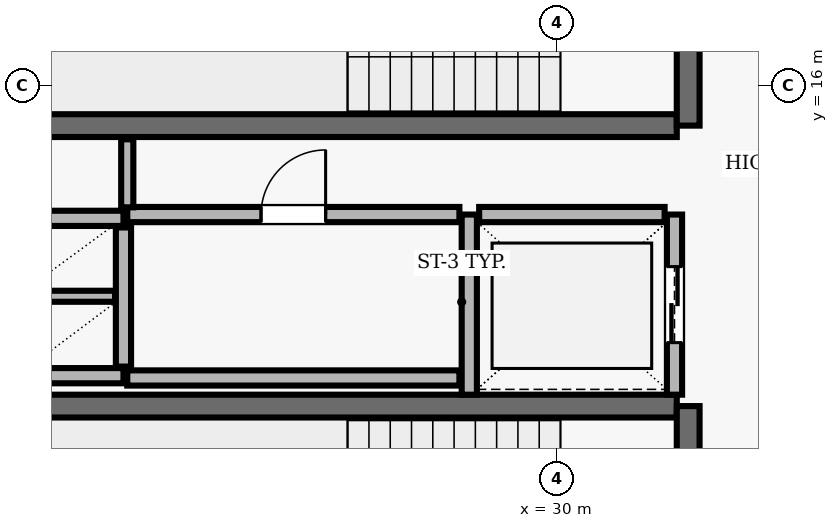
"""IFC4 building model, lengths in metres.
Left out: names, types, materials, properties, quantities, classifications, styles, units other than length and angle.
Written with IfcOpenShell. Run it as: python <this file> out.ifc"""

import sys

from ifc_helpers import new_model, si_unit, direction, frame, frame_2d, origin, place, context, subcontext, project, spatial, rectangle, extrude, element, fill, save


model = new_model("IFC4")
c1 = context("Model", 3, precision=1e-05, world=origin(), true_north=direction((0.0, 1.0)))
c2 = subcontext(c1, "Body", "Model", "MODEL_VIEW")
j1 = project(units=[si_unit("LENGTHUNIT", "METRE"), si_unit("PLANEANGLEUNIT", "RADIAN")], contexts=[c1])
p1 = place(None, origin())
s1 = spatial("IfcSite", under=j1, at=p1, CompositionType="ELEMENT")
p2 = place(p1, origin())
s2 = spatial("IfcBuilding", under=s1, at=p2, CompositionType="ELEMENT")
p3 = place(p2, frame((0.0, 0.0, 218.7)))
s3 = spatial("IfcBuildingStorey", under=s2, at=p3, CompositionType="ELEMENT", Elevation=218.7)
p4 = place(p3, frame((23.22, 15.47, 0.0), z_axis=(0.0, 0.0, 1.0), x_axis=(1.0, 0.0, 0.0)))
e1 = element("IfcWall", 1, at=p4, inside=s3, PredefinedType="SHEAR", context=c2, shape_type="SweptSolid", body=[
    extrude(rectangle(XDim=8.36, YDim=0.3, at=frame_2d((4.18, 0.0))), origin(), (0.0, 0.0, 1.0), 3.69),
])
p5 = place(p3, frame((31.73, 15.47, 0.0), z_axis=(0.0, 0.0, 1.0), x_axis=(0.0, 1.0, 0.0)))
e2 = element("IfcWall", 2, at=p5, inside=s3, PredefinedType="SHEAR", context=c2, shape_type="SweptSolid", body=[
    extrude(rectangle(XDim=3.51, YDim=0.3, at=frame_2d((1.755, 0.0))), origin(), (0.0, 0.0, 1.0), 3.69),
])
p6 = place(p5, frame((1.18, 0.0, 0.0)))
e3 = element("IfcOpeningElement", 3, at=p6, cuts=e2, PredefinedType="OPENING", context=c2, shape_type="SweptSolid", body=[
    extrude(rectangle(XDim=1.15, YDim=2.15, at=frame_2d((0.575, 1.075))), frame((0.0, 0.16, 0.0), z_axis=(0.0, -1.0, 0.0), x_axis=(1.0, 0.0, 0.0)), (0.0, 0.0, 1.0), 0.32),
])
p7 = place(p3, frame((31.58, 11.78, 0.0), z_axis=(0.0, 0.0, 1.0), x_axis=(-1.0, 0.0, 0.0)))
e4 = element("IfcWall", 4, at=p7, inside=s3, PredefinedType="SHEAR", context=c2, shape_type="SweptSolid", body=[
    extrude(rectangle(XDim=8.36, YDim=0.3, at=frame_2d((4.18, 0.0))), origin(), (0.0, 0.0, 1.0), 3.69),
])
p8 = place(p3, frame((31.73, 8.27, 0.0), z_axis=(0.0, 0.0, 1.0), x_axis=(0.0, 1.0, 0.0)))
e5 = element("IfcWall", 5, at=p8, inside=s3, PredefinedType="SHEAR", context=c2, shape_type="SweptSolid", body=[
    extrude(rectangle(XDim=3.51, YDim=0.3, at=frame_2d((1.755, 0.0))), origin(), (0.0, 0.0, 1.0), 3.69),
])
p9 = place(p8, frame((1.18, 0.0, 0.0)))
e6 = element("IfcOpeningElement", 6, at=p9, cuts=e5, PredefinedType="OPENING", context=c2, shape_type="SweptSolid", body=[
    extrude(rectangle(XDim=1.15, YDim=2.15, at=frame_2d((0.575, 1.075))), frame((0.0, 0.16, 0.0), z_axis=(0.0, -1.0, 0.0), x_axis=(1.0, 0.0, 0.0)), (0.0, 0.0, 1.0), 0.32),
])
p10 = place(p3, frame((28.85, 14.3, 0.0), z_axis=(0.0, 0.0, 1.0), x_axis=(0.0, -1.0, 0.0)))
e7 = element("IfcWall", 7, at=p10, inside=s3, PredefinedType="SOLIDWALL", context=c2, shape_type="SweptSolid", body=[
    extrude(rectangle(XDim=2.37, YDim=0.2, at=frame_2d((1.185, 0.0))), origin(), (0.0, 0.0, 1.0), 3.69),
])
p11 = place(p3, frame((31.55, 11.93, 0.0), z_axis=(0.0, 0.0, 1.0), x_axis=(0.0, 1.0, 0.0)))
e8 = element("IfcWall", 8, at=p11, inside=s3, PredefinedType="SOLIDWALL", context=c2, shape_type="SweptSolid", body=[
    extrude(rectangle(XDim=2.37, YDim=0.2, at=frame_2d((1.185, 0.0))), origin(), (0.0, 0.0, 1.0), 3.69),
])
p12 = place(p11, frame((0.685, 0.0, 0.0)))
e9 = element("IfcOpeningElement", 9, at=p12, cuts=e8, PredefinedType="OPENING", context=c2, shape_type="SweptSolid", body=[
    extrude(rectangle(XDim=1.0, YDim=2.1, at=frame_2d((0.5, 1.05))), frame((0.0, 0.11, 0.0), z_axis=(0.0, -1.0, 0.0), x_axis=(1.0, 0.0, 0.0)), (0.0, 0.0, 1.0), 0.22),
])
p13 = place(p3, frame((31.42, 14.3, 0.0), z_axis=(0.0, 0.0, 1.0), x_axis=(-1.0, 0.0, 0.0)))
e10 = element("IfcWall", 10, at=p13, inside=s3, PredefinedType="SOLIDWALL", context=c2, shape_type="SweptSolid", body=[
    extrude(rectangle(XDim=2.44, YDim=0.2, at=frame_2d((1.22, 0.0))), origin(), (0.0, 0.0, 1.0), 3.69),
])
for number, where, z_axis, x_axis in (
    (11, (22.9, 14.25, 0.0), (0.0, 0.0, 1.0), (1.0, 0.0, 0.0)),
    (12, (22.9, 12.18, 0.0), (0.0, 0.0, 1.0), (1.0, 0.0, 0.0)),
):
    element("IfcWall", number, at=place(p3, frame(where, z_axis=z_axis, x_axis=x_axis)), inside=s3, PredefinedType="SOLIDWALL", context=c2, shape_type="SweptSolid", body=[
        extrude(rectangle(XDim=1.4, YDim=0.2, at=frame_2d((0.7, 0.0))), origin(), (0.0, 0.0, 1.0), 3.69),
    ])
p14 = place(p3, frame((24.3, 12.3, 0.0), z_axis=(0.0, 0.0, 1.0), x_axis=(0.0, 1.0, 0.0)))
e13 = element("IfcWall", 13, at=p14, inside=s3, PredefinedType="SOLIDWALL", context=c2, shape_type="SweptSolid", body=[
    extrude(rectangle(XDim=1.83, YDim=0.2, at=frame_2d((0.915, 0.0))), origin(), (0.0, 0.0, 1.0), 3.69),
])
p15 = place(p3, frame((23.01, 13.225, 0.0), z_axis=(0.0, 0.0, 1.0), x_axis=(1.0, 0.0, 0.0)))
e14 = element("IfcWall", 14, at=p15, inside=s3, PredefinedType="PARTITIONING", context=c2, shape_type="SweptSolid", body=[
    extrude(rectangle(XDim=1.18, YDim=0.145, at=frame_2d((0.59, 0.0))), origin(), (0.0, 0.0, 1.0), 3.69),
])
p16 = place(p3, frame((24.35, 12.15, 0.0), z_axis=(0.0, 0.0, 1.0), x_axis=(1.0, 0.0, 0.0)))
e15 = element("IfcWall", 15, at=p16, inside=s3, PredefinedType="SOLIDWALL", context=c2, shape_type="SweptSolid", body=[
    extrude(rectangle(XDim=4.37, YDim=0.2, at=frame_2d((2.185, 0.0))), origin(), (0.0, 0.0, 1.0), 3.69),
])
p17 = place(p3, frame((24.35, 14.3, 0.0), z_axis=(0.0, 0.0, 1.0), x_axis=(1.0, 0.0, 0.0)))
e16 = element("IfcWall", 16, at=p17, inside=s3, PredefinedType="SOLIDWALL", context=c2, shape_type="SweptSolid", body=[
    extrude(rectangle(XDim=4.37, YDim=0.2, at=frame_2d((2.185, 0.0))), origin(), (0.0, 0.0, 1.0), 3.69),
])
p18 = place(p17, frame((1.76, 0.0, 0.0)))
e17 = element("IfcOpeningElement", 17, at=p18, cuts=e16, PredefinedType="OPENING", context=c2, shape_type="SweptSolid", body=[
    extrude(rectangle(XDim=0.85, YDim=2.1, at=frame_2d((0.425, 1.05))), frame((0.0, 0.11, 0.0), z_axis=(0.0, -1.0, 0.0), x_axis=(1.0, 0.0, 0.0)), (0.0, 0.0, 1.0), 0.22),
])
p19 = place(p3, frame((24.35, 15.29, 0.0), z_axis=(0.0, 0.0, 1.0), x_axis=(0.0, -1.0, 0.0)))
e18 = element("IfcWall", 18, at=p19, inside=s3, PredefinedType="PARTITIONING", context=c2, shape_type="SweptSolid", body=[
    extrude(rectangle(XDim=0.895, YDim=0.16, at=frame_2d((0.448, 0.0))), origin(), (0.0, 0.0, 1.0), 3.69),
])
p20 = place(p12, origin())
e19 = element("IfcDoor", 19, at=p20, inside=s3, OperationType="DOUBLE_DOOR_SLIDING", PredefinedType="DOOR", context=c2, shape_type="SweptSolid", body=[
    extrude(rectangle(XDim=1.0, YDim=2.1, at=frame_2d((0.5, 1.05))), frame((0.0, 0.025, 0.0), z_axis=(0.0, -1.0, 0.0), x_axis=(1.0, 0.0, 0.0)), (0.0, 0.0, 1.0), 0.05),
])
fill(e9, e19)
p21 = place(p18, origin())
e20 = element("IfcDoor", 20, at=p21, inside=s3, OperationType="SINGLE_SWING_RIGHT", PredefinedType="DOOR", context=c2, shape_type="SweptSolid", body=[
    extrude(rectangle(XDim=0.85, YDim=2.1, at=frame_2d((0.425, 1.05))), frame((0.0, 0.025, 0.0), z_axis=(0.0, -1.0, 0.0), x_axis=(1.0, 0.0, 0.0)), (0.0, 0.0, 1.0), 0.05),
])
fill(e17, e20)
save(model, sys.argv[1])
